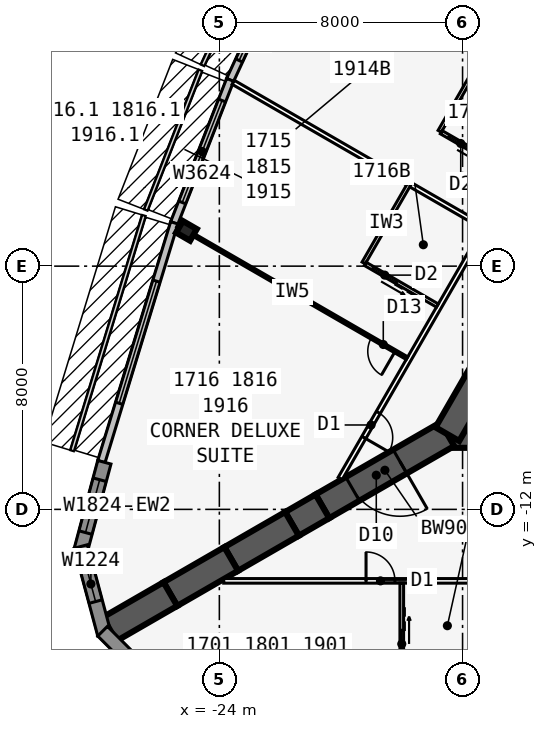
"""IFC4 building model, lengths in metres.
Left out: names, types, materials, properties, quantities, classifications, styles, units other than length and angle.
Written with IfcOpenShell. Run it as: python <this file> out.ifc"""

import sys

from ifc_helpers import new_model, si_unit, direction, frame, frame_2d, origin, origin_2d, place, context, subcontext, project, spatial, polyline, rectangle, i_section, outline, extrude, element, fill, save


model = new_model("IFC4")
c1 = context("Model", 3, precision=1e-05, world=origin(), true_north=direction((0.0, 1.0)))
c2 = subcontext(c1, "Body", "Model", "MODEL_VIEW")
j1 = project(units=[si_unit("LENGTHUNIT", "METRE"), si_unit("PLANEANGLEUNIT", "RADIAN")], contexts=[c1])
p1 = place(None, origin())
s1 = spatial("IfcSite", under=j1, at=p1, CompositionType="ELEMENT")
p2 = place(p1, origin())
s2 = spatial("IfcBuilding", under=s1, at=p2, CompositionType="ELEMENT")
p3 = place(p2, frame((0.0, 0.0, 69.3)))
s3 = spatial("IfcBuildingStorey", under=s2, at=p3, CompositionType="ELEMENT", Elevation=69.3)
p4 = place(p3, frame((-16.5, -9.526, 0.0), z_axis=(0.0, 0.0, 1.0), x_axis=(1.0, 0.0, 0.0)))
e1 = element("IfcWall", 1, at=p4, inside=s3, PredefinedType="SHEAR", context=c2, shape_type="SweptSolid", body=[
    extrude(rectangle(XDim=33.0, YDim=0.9, at=frame_2d((16.5, 0.0))), origin(), (0.0, 0.0, 1.0), 3.4),
])
p5 = place(p4, frame((14.05, 0.0, 0.0)))
e2 = element("IfcOpeningElement", 2, at=p5, cuts=e1, PredefinedType="OPENING", context=c2, shape_type="SweptSolid", body=[
    extrude(rectangle(XDim=1.8, YDim=2.13, at=frame_2d((0.9, 1.065))), frame((0.0, 0.46, 0.0), z_axis=(0.0, -1.0, 0.0), x_axis=(1.0, 0.0, 0.0)), (0.0, 0.0, 1.0), 0.92),
])
p6 = place(p3, frame((0.0, 19.052, 0.0), z_axis=(0.0, 0.0, 1.0), x_axis=(-0.499999749417, -0.866025548458, 0.0)))
e3 = element("IfcWall", 3, at=p6, inside=s3, PredefinedType="SHEAR", context=c2, shape_type="SweptSolid", body=[
    extrude(rectangle(XDim=33.0, YDim=0.9, at=frame_2d((16.5, 0.0))), origin(), (0.0, 0.0, 1.0), 3.4),
])
p7 = place(p6, frame((14.15, 0.0, 0.0)))
e4 = element("IfcOpeningElement", 4, at=p7, cuts=e3, PredefinedType="OPENING", context=c2, shape_type="SweptSolid", body=[
    extrude(rectangle(XDim=1.8, YDim=2.13, at=frame_2d((0.9, 1.065))), frame((0.0, 0.46, 0.0), z_axis=(0.0, -1.0, 0.0), x_axis=(1.0, 0.0, 0.0)), (0.0, 0.0, 1.0), 0.92),
])
p8 = place(p6, frame((12.6, 0.0, 0.0)))
e5 = element("IfcOpeningElement", 5, at=p8, cuts=e3, PredefinedType="OPENING", context=c2, shape_type="SweptSolid", body=[
    extrude(rectangle(XDim=1.0, YDim=2.13, at=frame_2d((0.5, 1.065))), frame((0.0, 0.46, 0.0), z_axis=(0.0, -1.0, 0.0), x_axis=(1.0, 0.0, 0.0)), (0.0, 0.0, 1.0), 0.92),
])
p9 = place(p3, frame((-16.5, -9.526, 0.0), z_axis=(0.0, 0.0, 1.0), x_axis=(-0.866031398331, -0.499989616998, 0.0)))
e6 = element("IfcWall", 6, at=p9, inside=s3, PredefinedType="SHEAR", context=c2, shape_type="SweptSolid", body=[
    extrude(rectangle(XDim=4.746, YDim=0.9, at=frame_2d((2.373, 0.0))), origin(), (0.0, 0.0, 1.0), 3.4),
])
p10 = place(p9, frame((1.8, 0.0, 0.0)))
e7 = element("IfcOpeningElement", 7, at=p10, cuts=e6, PredefinedType="OPENING", context=c2, shape_type="SweptSolid", body=[
    extrude(rectangle(XDim=1.8, YDim=2.13, at=frame_2d((0.9, 1.065))), frame((0.0, 0.46, 0.0), z_axis=(0.0, -1.0, 0.0), x_axis=(1.0, 0.0, 0.0)), (0.0, 0.0, 1.0), 0.92),
])
p11 = place(p3, frame((-20.61, -11.899, 0.0), z_axis=(0.0, 0.0, 1.0), x_axis=(-0.866009537788, -0.500027479704, 0.0)))
e8 = element("IfcWall", 8, at=p11, inside=s3, PredefinedType="SHEAR", context=c2, shape_type="SweptSolid", body=[
    extrude(rectangle(XDim=1.155, YDim=0.9, at=frame_2d((0.577, 0.0))), origin(), (0.0, 0.0, 1.0), 3.4),
])
for number, where, z_axis, x_axis in (
    (9, (-21.61, -12.477, 0.0), (0.0, 0.0, 1.0), (-0.866, -0.5, 0.0)),
    (10, (-23.61, -13.631, 0.0), (0.0, 0.0, 1.0), (-0.866, -0.5, 0.0)),
    (11, (-25.61, -14.786, 0.0), (0.0, 0.0, 1.0), (-0.866, -0.5, 0.0)),
):
    element("IfcWall", number, at=place(p3, frame(where, z_axis=z_axis, x_axis=x_axis)), inside=s3, PredefinedType="SHEAR", context=c2, shape_type="SweptSolid", body=[
        extrude(rectangle(XDim=2.309, YDim=0.9, at=frame_2d((1.155, 0.0))), origin(), (0.0, 0.0, 1.0), 3.4),
    ])
p12 = place(p3, frame((-25.083, -2.839, 0.0), z_axis=(0.0, 0.0, 1.0), x_axis=(-0.5, -0.866025403784, 0.0)))
e12 = element("IfcColumn", 12, at=p12, inside=s3, PredefinedType="COLUMN", context=c2, shape_type="SweptSolid", body=[
    extrude(i_section(OverallWidth=0.442, OverallDepth=0.531, WebThickness=0.066, FlangeThickness=0.106, at=origin_2d()), origin(), (0.0, 0.0, 1.0), 3.4),
])
p13 = place(p3, frame((-21.543, 6.678, 0.0), z_axis=(0.0, 0.0, 1.0), x_axis=(-0.419203100754, -0.907892482796, 0.0)))
e13 = element("IfcWall", 13, at=p13, inside=s3, PredefinedType="STANDARD", context=c2, shape_type="SweptSolid", body=[
    extrude(rectangle(XDim=5.021, YDim=0.25, at=frame_2d((2.51, 0.0))), origin(), (0.0, 0.0, 1.0), 3.235),
])
p14 = place(p13, frame((0.71, 0.0, 0.45)))
e14 = element("IfcOpeningElement", 14, at=p14, cuts=e13, PredefinedType="OPENING", context=c2, shape_type="SweptSolid", body=[
    extrude(rectangle(XDim=3.6, YDim=2.4, at=frame_2d((1.8, 1.2))), frame((0.0, 0.135, 0.0), z_axis=(0.0, -1.0, 0.0), x_axis=(1.0, 0.0, 0.0)), (0.0, 0.0, 1.0), 0.27),
])
p15 = place(p3, frame((-23.645, 2.126, 0.0), z_axis=(0.0, 0.0, 1.0), x_axis=(-0.364013463868, -0.931393685894, 0.0)))
e15 = element("IfcWall", 15, at=p15, inside=s3, PredefinedType="STANDARD", context=c2, shape_type="SweptSolid", body=[
    extrude(rectangle(XDim=5.058, YDim=0.25, at=frame_2d((2.529, 0.0))), origin(), (0.0, 0.0, 1.0), 3.235),
])
p16 = place(p15, frame((0.729, 0.0, 0.45)))
e16 = element("IfcOpeningElement", 16, at=p16, cuts=e15, PredefinedType="OPENING", context=c2, shape_type="SweptSolid", body=[
    extrude(rectangle(XDim=3.6, YDim=2.4, at=frame_2d((1.8, 1.2))), frame((0.0, 0.135, 0.0), z_axis=(0.0, -1.0, 0.0), x_axis=(1.0, 0.0, 0.0)), (0.0, 0.0, 1.0), 0.27),
])
p17 = place(p3, frame((-25.483, -2.575, 0.0), z_axis=(0.0, 0.0, 1.0), x_axis=(-0.2919790669, -0.956424709265, 0.0)))
e17 = element("IfcWall", 17, at=p17, inside=s3, PredefinedType="STANDARD", context=c2, shape_type="SweptSolid", body=[
    extrude(rectangle(XDim=8.211, YDim=0.25, at=frame_2d((4.105, 0.0))), origin(), (0.0, 0.0, 1.0), 3.235),
])
p18 = place(p17, frame((2.006, 0.0, 0.45)))
e18 = element("IfcOpeningElement", 18, at=p18, cuts=e17, PredefinedType="OPENING", context=c2, shape_type="SweptSolid", body=[
    extrude(rectangle(XDim=4.2, YDim=2.4, at=frame_2d((2.1, 1.2))), frame((0.0, 0.135, 0.0), z_axis=(0.0, -1.0, 0.0), x_axis=(1.0, 0.0, 0.0)), (0.0, 0.0, 1.0), 0.27),
])
p19 = place(p3, frame((-27.783, -10.45, 0.0), z_axis=(0.0, 0.0, 1.0), x_axis=(-0.258780998834, -0.965936019953, 0.0)))
e19 = element("IfcWall", 19, at=p19, inside=s3, PredefinedType="SOLIDWALL", context=c2, shape_type="SweptSolid", body=[
    extrude(rectangle(XDim=2.989, YDim=0.45, at=frame_2d((1.494, 0.0))), origin(), (0.0, 0.0, 1.0), 3.235),
])
p20 = place(p19, frame((0.594, 0.0, 0.45)))
e20 = element("IfcOpeningElement", 20, at=p20, cuts=e19, PredefinedType="OPENING", context=c2, shape_type="SweptSolid", body=[
    extrude(rectangle(XDim=1.8, YDim=2.4, at=frame_2d((0.9, 1.2))), frame((0.0, 0.235, 0.0), z_axis=(0.0, -1.0, 0.0), x_axis=(1.0, 0.0, 0.0)), (0.0, 0.0, 1.0), 0.47),
])
p21 = place(p3, frame((-28.556, -13.221, 0.0), z_axis=(0.0, 0.0, 1.0), x_axis=(0.258801419081, -0.965930548995, 0.0)))
e21 = element("IfcWall", 21, at=p21, inside=s3, PredefinedType="SOLIDWALL", context=c2, shape_type="SweptSolid", body=[
    extrude(outline(polyline([(2.989, 0.225), (2.929, 0.225), (2.437, 0.093), (2.402, 0.225), (0.0, 0.225), (0.0, -0.225), (2.989, -0.225), (2.989, 0.225)])), origin(), (0.0, 0.0, 1.0), 3.235),
])
p22 = place(p21, frame((0.676, 0.0, 0.45)))
e22 = element("IfcOpeningElement", 22, at=p22, cuts=e21, PredefinedType="OPENING", context=c2, shape_type="SweptSolid", body=[
    extrude(rectangle(XDim=1.2, YDim=2.4, at=frame_2d((0.6, 1.2))), frame((0.0, 0.235, 0.0), z_axis=(0.0, -1.0, 0.0), x_axis=(1.0, 0.0, 0.0)), (0.0, 0.0, 1.0), 0.47),
])
p23 = place(p3, frame((-27.841, -16.007, 0.0), z_axis=(0.0, 0.0, 1.0), x_axis=(0.707025086683, -0.707188466253, 0.0)))
e23 = element("IfcWall", 23, at=p23, inside=s3, PredefinedType="SOLIDWALL", context=c2, shape_type="SweptSolid", body=[
    extrude(outline(polyline([(2.989, 0.225), (0.586, 0.225), (0.551, 0.093), (0.059, 0.225), (0.0, 0.225), (0.0, -0.225), (2.989, -0.225), (2.989, 0.225)])), origin(), (0.0, 0.0, 1.0), 3.235),
])
p24 = place(p23, frame((1.113, 0.0, 0.45)))
e24 = element("IfcOpeningElement", 24, at=p24, cuts=e23, PredefinedType="OPENING", context=c2, shape_type="SweptSolid", body=[
    extrude(rectangle(XDim=1.2, YDim=2.4, at=frame_2d((0.6, 1.2))), frame((0.0, 0.235, 0.0), z_axis=(0.0, -1.0, 0.0), x_axis=(1.0, 0.0, 0.0)), (0.0, 0.0, 1.0), 0.47),
])
p25 = place(p3, frame((-23.857, -14.351, 0.0), z_axis=(0.0, 0.0, 1.0), x_axis=(1.0, 0.0, 0.0)))
e25 = element("IfcWall", 25, at=p25, inside=s3, PredefinedType="PARTITIONING", context=c2, shape_type="SweptSolid", body=[
    extrude(rectangle(XDim=47.714, YDim=0.15, at=frame_2d((23.857, 0.0))), origin(), (0.0, 0.0, 1.0), 3.235),
])
p26 = place(p25, frame((4.682, 0.0, 0.0)))
e26 = element("IfcOpeningElement", 26, at=p26, cuts=e25, PredefinedType="OPENING", context=c2, shape_type="SweptSolid", body=[
    extrude(rectangle(XDim=0.95, YDim=2.13, at=frame_2d((0.475, 1.065))), frame((0.0, 0.085, 0.0), z_axis=(0.0, -1.0, 0.0), x_axis=(1.0, 0.0, 0.0)), (0.0, 0.0, 1.0), 0.17),
])
p27 = place(p25, frame((10.282, 0.0, 0.0)))
e27 = element("IfcOpeningElement", 27, at=p27, cuts=e25, PredefinedType="OPENING", context=c2, shape_type="SweptSolid", body=[
    extrude(rectangle(XDim=0.95, YDim=2.13, at=frame_2d((0.475, 1.065))), frame((0.0, 0.085, 0.0), z_axis=(0.0, -1.0, 0.0), x_axis=(1.0, 0.0, 0.0)), (0.0, 0.0, 1.0), 0.17),
])
p28 = place(p25, frame((15.882, 0.0, 0.0)))
e28 = element("IfcOpeningElement", 28, at=p28, cuts=e25, PredefinedType="OPENING", context=c2, shape_type="SweptSolid", body=[
    extrude(rectangle(XDim=0.95, YDim=2.13, at=frame_2d((0.475, 1.065))), frame((0.0, 0.085, 0.0), z_axis=(0.0, -1.0, 0.0), x_axis=(1.0, 0.0, 0.0)), (0.0, 0.0, 1.0), 0.17),
])
p29 = place(p25, frame((25.857, 0.0, 0.0)))
e29 = element("IfcOpeningElement", 29, at=p29, cuts=e25, PredefinedType="OPENING", context=c2, shape_type="SweptSolid", body=[
    extrude(rectangle(XDim=1.0, YDim=2.13, at=frame_2d((0.5, 1.065))), frame((0.0, 0.085, 0.0), z_axis=(0.0, -1.0, 0.0), x_axis=(1.0, 0.0, 0.0)), (0.0, 0.0, 1.0), 0.17),
])
p30 = place(p25, frame((29.682, 0.0, 0.0)))
e30 = element("IfcOpeningElement", 30, at=p30, cuts=e25, PredefinedType="OPENING", context=c2, shape_type="SweptSolid", body=[
    extrude(rectangle(XDim=0.95, YDim=2.13, at=frame_2d((0.475, 1.065))), frame((0.0, 0.085, 0.0), z_axis=(0.0, -1.0, 0.0), x_axis=(1.0, 0.0, 0.0)), (0.0, 0.0, 1.0), 0.17),
])
p31 = place(p25, frame((36.482, 0.0, 0.0)))
e31 = element("IfcOpeningElement", 31, at=p31, cuts=e25, PredefinedType="OPENING", context=c2, shape_type="SweptSolid", body=[
    extrude(rectangle(XDim=0.95, YDim=2.13, at=frame_2d((0.475, 1.065))), frame((0.0, 0.085, 0.0), z_axis=(0.0, -1.0, 0.0), x_axis=(1.0, 0.0, 0.0)), (0.0, 0.0, 1.0), 0.17),
])
p32 = place(p25, frame((42.082, 0.0, 0.0)))
e32 = element("IfcOpeningElement", 32, at=p32, cuts=e25, PredefinedType="OPENING", context=c2, shape_type="SweptSolid", body=[
    extrude(rectangle(XDim=0.95, YDim=2.13, at=frame_2d((0.475, 1.065))), frame((0.0, 0.085, 0.0), z_axis=(0.0, -1.0, 0.0), x_axis=(1.0, 0.0, 0.0)), (0.0, 0.0, 1.0), 0.17),
])
p33 = place(p3, frame((-18.0, -14.426, 0.0), z_axis=(0.0, 0.0, 1.0), x_axis=(0.0, -1.0, 0.0)))
e33 = element("IfcWall", 33, at=p33, inside=s3, PredefinedType="PLUMBINGWALL", context=c2, shape_type="SweptSolid", body=[
    extrude(rectangle(XDim=2.74, YDim=0.12, at=frame_2d((1.37, 0.0))), origin(), (0.0, 0.0, 1.0), 3.235),
])
p34 = place(p33, frame((1.55, 0.0, 0.0)))
e34 = element("IfcOpeningElement", 34, at=p34, cuts=e33, PredefinedType="OPENING", context=c2, shape_type="SweptSolid", body=[
    extrude(rectangle(XDim=0.9, YDim=2.13, at=frame_2d((0.45, 1.065))), frame((0.0, 0.07, 0.0), z_axis=(0.0, -1.0, 0.0), x_axis=(1.0, 0.0, 0.0)), (0.0, 0.0, 1.0), 0.14),
])
p35 = place(p3, frame((-0.5, 22.836, 0.0), z_axis=(0.0, 0.0, 1.0), x_axis=(-0.500001677587, -0.866024435227, 0.0)))
e35 = element("IfcWall", 35, at=p35, inside=s3, PredefinedType="PARTITIONING", context=c2, shape_type="SweptSolid", body=[
    extrude(rectangle(XDim=39.054, YDim=0.15, at=frame_2d((19.527, 0.0))), origin(), (0.0, 0.0, 1.0), 3.235),
])
p36 = place(p35, frame((1.558, 0.0, 0.0)))
e36 = element("IfcOpeningElement", 36, at=p36, cuts=e35, PredefinedType="OPENING", context=c2, shape_type="SweptSolid", body=[
    extrude(rectangle(XDim=0.95, YDim=2.13, at=frame_2d((0.475, 1.065))), frame((0.0, 0.085, 0.0), z_axis=(0.0, -1.0, 0.0), x_axis=(1.0, 0.0, 0.0)), (0.0, 0.0, 1.0), 0.17),
])
p37 = place(p35, frame((11.552, 0.0, 0.0)))
e37 = element("IfcOpeningElement", 37, at=p37, cuts=e35, PredefinedType="OPENING", context=c2, shape_type="SweptSolid", body=[
    extrude(rectangle(XDim=0.95, YDim=2.13, at=frame_2d((0.475, 1.065))), frame((0.0, 0.085, 0.0), z_axis=(0.0, -1.0, 0.0), x_axis=(1.0, 0.0, 0.0)), (0.0, 0.0, 1.0), 0.17),
])
p38 = place(p35, frame((20.952, 0.0, 0.0)))
e38 = element("IfcOpeningElement", 38, at=p38, cuts=e35, PredefinedType="OPENING", context=c2, shape_type="SweptSolid", body=[
    extrude(rectangle(XDim=0.95, YDim=2.13, at=frame_2d((0.475, 1.065))), frame((0.0, 0.085, 0.0), z_axis=(0.0, -1.0, 0.0), x_axis=(1.0, 0.0, 0.0)), (0.0, 0.0, 1.0), 0.17),
])
p39 = place(p35, frame((27.752, 0.0, 0.0)))
e39 = element("IfcOpeningElement", 39, at=p39, cuts=e35, PredefinedType="OPENING", context=c2, shape_type="SweptSolid", body=[
    extrude(rectangle(XDim=0.95, YDim=2.13, at=frame_2d((0.475, 1.065))), frame((0.0, 0.085, 0.0), z_axis=(0.0, -1.0, 0.0), x_axis=(1.0, 0.0, 0.0)), (0.0, 0.0, 1.0), 0.17),
])
p40 = place(p35, frame((36.546, 0.0, 0.0)))
e40 = element("IfcOpeningElement", 40, at=p40, cuts=e35, PredefinedType="OPENING", context=c2, shape_type="SweptSolid", body=[
    extrude(rectangle(XDim=0.95, YDim=2.13, at=frame_2d((0.475, 1.065))), frame((0.0, 0.085, 0.0), z_axis=(0.0, -1.0, 0.0), x_axis=(1.0, 0.0, 0.0)), (0.0, 0.0, 1.0), 0.17),
])
p41 = place(p3, frame((-12.829, 1.633, 0.0), z_axis=(0.0, 0.0, 1.0), x_axis=(-0.866026934769, 0.499997348248, 0.0)))
e41 = element("IfcWall", 41, at=p41, inside=s3, PredefinedType="PARTITIONING", context=c2, shape_type="SweptSolid", body=[
    extrude(rectangle(XDim=9.943, YDim=0.15, at=frame_2d((4.971, 0.0))), origin(), (0.0, 0.0, 1.0), 2.389),
])
p42 = place(p3, frame((-15.329, -2.697, 0.0), z_axis=(0.0, 0.0, 1.0), x_axis=(-0.866018409083, 0.500012114982, 0.0)))
e42 = element("IfcWall", 42, at=p42, inside=s3, PredefinedType="PARTITIONING", context=c2, shape_type="SweptSolid", body=[
    extrude(rectangle(XDim=9.485, YDim=0.15, at=frame_2d((4.742, 0.0))), origin(), (0.0, 0.0, 1.0), 2.389),
])
p43 = place(p3, frame((-17.829, -7.027, 0.0), z_axis=(0.0, 0.0, 1.0), x_axis=(-0.866032659912, 0.499987431809, 0.0)))
e43 = element("IfcWall", 43, at=p43, inside=s3, PredefinedType="PARTITIONING", context=c2, shape_type="SweptSolid", body=[
    extrude(rectangle(XDim=8.72, YDim=0.1, at=frame_2d((4.36, 0.0))), origin(), (0.0, 0.0, 1.0), 2.389),
])
p44 = place(p43, frame((0.45, 0.0, 0.0)))
e44 = element("IfcOpeningElement", 44, at=p44, cuts=e43, PredefinedType="OPENING", context=c2, shape_type="SweptSolid", body=[
    extrude(rectangle(XDim=0.9, YDim=2.13, at=frame_2d((0.45, 1.065))), frame((0.0, 0.06, 0.0), z_axis=(0.0, -1.0, 0.0), x_axis=(1.0, 0.0, 0.0)), (0.0, 0.0, 1.0), 0.12),
])
p45 = place(p3, frame((-15.253, 3.033, 0.0), z_axis=(0.0, 0.0, 1.0), x_axis=(-0.499990139034, -0.866031096941, 0.0)))
e45 = element("IfcWall", 45, at=p45, inside=s3, PredefinedType="PLUMBINGWALL", context=c2, shape_type="SweptSolid", body=[
    extrude(rectangle(XDim=3.0, YDim=0.12, at=frame_2d((1.5, 0.0))), origin(), (0.0, 0.0, 1.0), 3.235),
])
p46 = place(p3, frame((-14.329, -0.965, 0.0), z_axis=(0.0, 0.0, 1.0), x_axis=(-0.866035715982, 0.499982138324, 0.0)))
e46 = element("IfcWall", 46, at=p46, inside=s3, PredefinedType="PLUMBINGWALL", context=c2, shape_type="SweptSolid", body=[
    extrude(rectangle(XDim=2.74, YDim=0.12, at=frame_2d((1.37, 0.0))), origin(), (0.0, 0.0, 1.0), 3.235),
])
p47 = place(p46, frame((1.55, 0.0, 0.0)))
e47 = element("IfcOpeningElement", 47, at=p47, cuts=e46, PredefinedType="OPENING", context=c2, shape_type="SweptSolid", body=[
    extrude(rectangle(XDim=0.9, YDim=2.13, at=frame_2d((0.45, 1.065))), frame((0.0, 0.07, 0.0), z_axis=(0.0, -1.0, 0.0), x_axis=(1.0, 0.0, 0.0)), (0.0, 0.0, 1.0), 0.14),
])
p48 = place(p3, frame((-17.753, -1.297, 0.0), z_axis=(0.0, 0.0, 1.0), x_axis=(-0.499990139034, -0.866031096941, 0.0)))
e48 = element("IfcWall", 48, at=p48, inside=s3, PredefinedType="PLUMBINGWALL", context=c2, shape_type="SweptSolid", body=[
    extrude(rectangle(XDim=3.0, YDim=0.12, at=frame_2d((1.5, 0.0))), origin(), (0.0, 0.0, 1.0), 3.235),
])
p49 = place(p3, frame((-16.829, -5.295, 0.0), z_axis=(0.0, 0.0, 1.0), x_axis=(-0.866035715982, 0.499982138324, 0.0)))
e49 = element("IfcWall", 49, at=p49, inside=s3, PredefinedType="PLUMBINGWALL", context=c2, shape_type="SweptSolid", body=[
    extrude(rectangle(XDim=2.74, YDim=0.12, at=frame_2d((1.37, 0.0))), origin(), (0.0, 0.0, 1.0), 3.235),
])
p50 = place(p49, frame((1.55, 0.0, 0.0)))
e50 = element("IfcOpeningElement", 50, at=p50, cuts=e49, PredefinedType="OPENING", context=c2, shape_type="SweptSolid", body=[
    extrude(rectangle(XDim=0.9, YDim=2.13, at=frame_2d((0.45, 1.065))), frame((0.0, 0.07, 0.0), z_axis=(0.0, -1.0, 0.0), x_axis=(1.0, 0.0, 0.0)), (0.0, 0.0, 1.0), 0.14),
])
p51 = place(p14, origin())
e51 = element("IfcWindow", 51, at=p51, inside=s3, PartitioningType="SINGLE_PANEL", PredefinedType="WINDOW", context=c2, shape_type="SweptSolid", body=[
    extrude(rectangle(XDim=3.6, YDim=2.4, at=frame_2d((1.8, 1.2))), frame((0.0, 0.03, 0.0), z_axis=(0.0, -1.0, 0.0), x_axis=(1.0, 0.0, 0.0)), (0.0, 0.0, 1.0), 0.06),
])
fill(e14, e51)
p52 = place(p16, origin())
e52 = element("IfcWindow", 52, at=p52, inside=s3, PartitioningType="SINGLE_PANEL", PredefinedType="WINDOW", context=c2, shape_type="SweptSolid", body=[
    extrude(rectangle(XDim=3.6, YDim=2.4, at=frame_2d((1.8, 1.2))), frame((0.0, 0.03, 0.0), z_axis=(0.0, -1.0, 0.0), x_axis=(1.0, 0.0, 0.0)), (0.0, 0.0, 1.0), 0.06),
])
fill(e16, e52)
p53 = place(p18, origin())
e53 = element("IfcWindow", 53, at=p53, inside=s3, PartitioningType="SINGLE_PANEL", PredefinedType="WINDOW", context=c2, shape_type="SweptSolid", body=[
    extrude(rectangle(XDim=4.2, YDim=2.4, at=frame_2d((2.1, 1.2))), frame((0.0, 0.03, 0.0), z_axis=(0.0, -1.0, 0.0), x_axis=(1.0, 0.0, 0.0)), (0.0, 0.0, 1.0), 0.06),
])
fill(e18, e53)
p54 = place(p20, origin())
e54 = element("IfcWindow", 54, at=p54, inside=s3, PartitioningType="SINGLE_PANEL", PredefinedType="WINDOW", context=c2, shape_type="SweptSolid", body=[
    extrude(rectangle(XDim=1.8, YDim=2.4, at=frame_2d((0.9, 1.2))), frame((0.0, 0.03, 0.0), z_axis=(0.0, -1.0, 0.0), x_axis=(1.0, 0.0, 0.0)), (0.0, 0.0, 1.0), 0.06),
])
fill(e20, e54)
p55 = place(p22, origin())
e55 = element("IfcWindow", 55, at=p55, inside=s3, PartitioningType="SINGLE_PANEL", PredefinedType="WINDOW", context=c2, shape_type="SweptSolid", body=[
    extrude(rectangle(XDim=1.2, YDim=2.4, at=frame_2d((0.6, 1.2))), frame((0.0, 0.03, 0.0), z_axis=(0.0, -1.0, 0.0), x_axis=(1.0, 0.0, 0.0)), (0.0, 0.0, 1.0), 0.06),
])
fill(e22, e55)
p56 = place(p34, origin())
e56 = element("IfcDoor", 56, at=p56, inside=s3, OperationType="SLIDING_TO_LEFT", PredefinedType="DOOR", context=c2, shape_type="SweptSolid", body=[
    extrude(rectangle(XDim=0.9, YDim=2.13, at=frame_2d((0.45, 1.065))), frame((0.0, 0.025, 0.0), z_axis=(0.0, -1.0, 0.0), x_axis=(1.0, 0.0, 0.0)), (0.0, 0.0, 1.0), 0.05),
])
fill(e34, e56)
p57 = place(p26, origin())
e57 = element("IfcDoor", 57, at=p57, inside=s3, OperationType="SINGLE_SWING_LEFT", PredefinedType="DOOR", context=c2, shape_type="SweptSolid", body=[
    extrude(rectangle(XDim=0.95, YDim=2.13, at=frame_2d((0.475, 1.065))), frame((0.0, 0.025, 0.0), z_axis=(0.0, -1.0, 0.0), x_axis=(1.0, 0.0, 0.0)), (0.0, 0.0, 1.0), 0.05),
])
fill(e26, e57)
p58 = place(p44, origin())
e58 = element("IfcDoor", 58, at=p58, inside=s3, OperationType="SINGLE_SWING_LEFT", PredefinedType="DOOR", context=c2, shape_type="SweptSolid", body=[
    extrude(rectangle(XDim=0.9, YDim=2.13, at=frame_2d((0.45, 1.065))), frame((0.0, 0.025, 0.0), z_axis=(0.0, -1.0, 0.0), x_axis=(1.0, 0.0, 0.0)), (0.0, 0.0, 1.0), 0.05),
])
fill(e44, e58)
p59 = place(p47, origin())
e59 = element("IfcDoor", 59, at=p59, inside=s3, OperationType="SLIDING_TO_LEFT", PredefinedType="DOOR", context=c2, shape_type="SweptSolid", body=[
    extrude(rectangle(XDim=0.9, YDim=2.13, at=frame_2d((0.45, 1.065))), frame((0.0, 0.025, 0.0), z_axis=(0.0, -1.0, 0.0), x_axis=(1.0, 0.0, 0.0)), (0.0, 0.0, 1.0), 0.05),
])
fill(e47, e59)
p60 = place(p50, origin())
e60 = element("IfcDoor", 60, at=p60, inside=s3, OperationType="SLIDING_TO_LEFT", PredefinedType="DOOR", context=c2, shape_type="SweptSolid", body=[
    extrude(rectangle(XDim=0.9, YDim=2.13, at=frame_2d((0.45, 1.065))), frame((0.0, 0.025, 0.0), z_axis=(0.0, -1.0, 0.0), x_axis=(1.0, 0.0, 0.0)), (0.0, 0.0, 1.0), 0.05),
])
fill(e50, e60)
p61 = place(p40, origin())
e61 = element("IfcDoor", 61, at=p61, inside=s3, OperationType="SINGLE_SWING_RIGHT", PredefinedType="DOOR", context=c2, shape_type="SweptSolid", body=[
    extrude(rectangle(XDim=0.95, YDim=2.13, at=frame_2d((0.475, 1.065))), frame((0.0, 0.025, 0.0), z_axis=(0.0, -1.0, 0.0), x_axis=(1.0, 0.0, 0.0)), (0.0, 0.0, 1.0), 0.05),
])
fill(e40, e61)
p62 = place(p10, origin())
e62 = element("IfcDoor", 62, at=p62, inside=s3, OperationType="DOUBLE_DOOR_DOUBLE_SWING", PredefinedType="DOOR", context=c2, shape_type="SweptSolid", body=[
    extrude(rectangle(XDim=1.8, YDim=2.13, at=frame_2d((0.9, 1.065))), frame((0.0, 0.025, 0.0), z_axis=(0.0, -1.0, 0.0), x_axis=(1.0, 0.0, 0.0)), (0.0, 0.0, 1.0), 0.05),
])
fill(e7, e62)
save(model, sys.argv[1])
